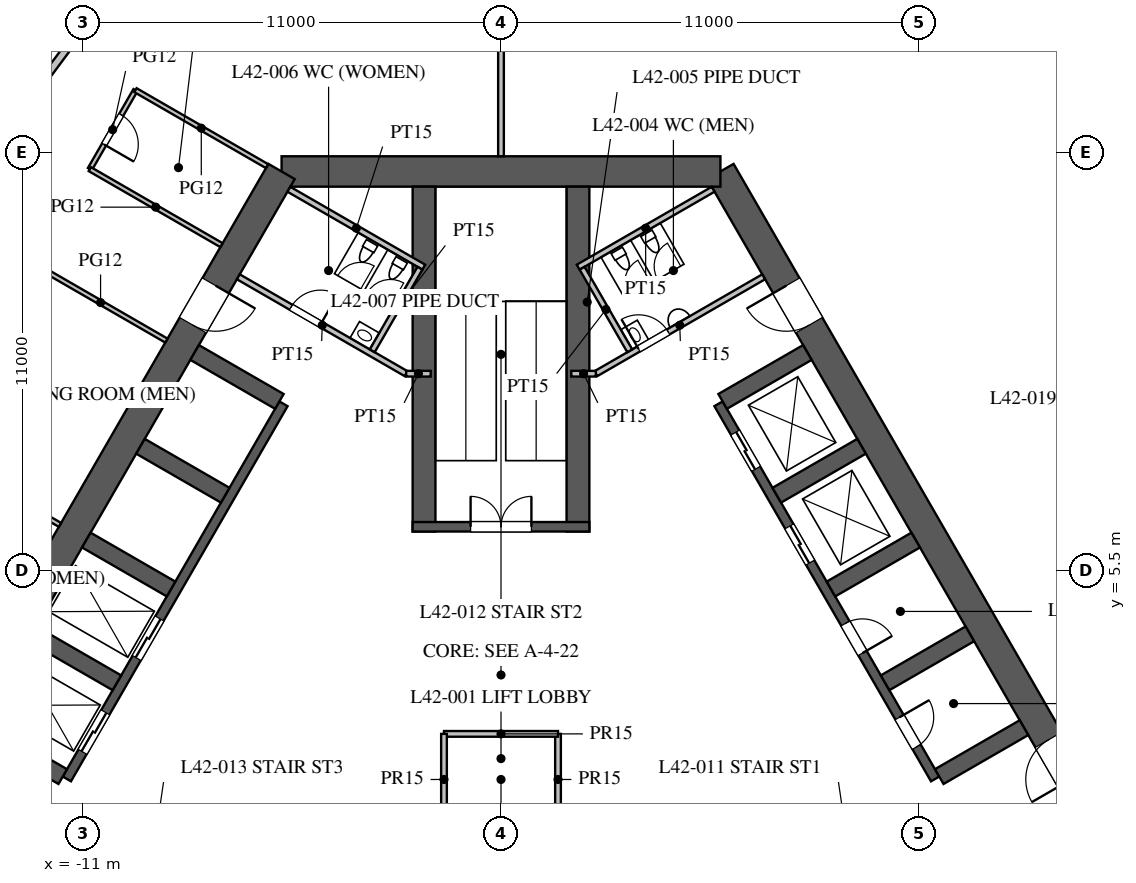
"""IFC4 building model, lengths in metres.
Left out: names, types, materials, properties, quantities, classifications, styles, units other than length and angle.
Written with IfcOpenShell. Run it as: python <this file> out.ifc"""

import sys

from ifc_helpers import new_model, si_unit, direction, frame, frame_2d, origin, place, context, subcontext, project, spatial, rectangle, extrude, element, fill, save


model = new_model("IFC4")
c1 = context("Model", 3, precision=1e-05, world=origin(), true_north=direction((0.0, 1.0)))
c2 = subcontext(c1, "Body", "Model", "MODEL_VIEW")
j1 = project(units=[si_unit("LENGTHUNIT", "METRE"), si_unit("PLANEANGLEUNIT", "RADIAN")], contexts=[c1])
p1 = place(None, origin())
s1 = spatial("IfcSite", under=j1, at=p1, CompositionType="ELEMENT")
p2 = place(p1, origin())
s2 = spatial("IfcBuilding", under=s1, at=p2, CompositionType="ELEMENT")
p3 = place(p2, frame((0.0, 0.0, 184.7)))
s3 = spatial("IfcBuildingStorey", under=s2, at=p3, CompositionType="ELEMENT", Elevation=184.7)
p4 = place(p3, frame((16.743, -3.0, 0.0), z_axis=(0.0, 0.0, 1.0), x_axis=(-0.500002442456, 0.866023993627, 0.0)))
e1 = element("IfcWall", 1, at=p4, inside=s3, PredefinedType="SHEAR", context=c2, shape_type="SweptSolid", body=[
    extrude(rectangle(XDim=21.939, YDim=0.8, at=frame_2d((10.97, 0.0))), origin(), (0.0, 0.0, 1.0), 5.0),
])
p5 = place(p4, frame((17.27, 0.0, 0.0)))
e2 = element("IfcOpeningElement", 2, at=p5, cuts=e1, PredefinedType="OPENING", context=c2, shape_type="SweptSolid", body=[
    extrude(rectangle(XDim=1.2, YDim=2.1, at=frame_2d((0.6, 1.05))), frame((0.0, 0.41, 0.0), z_axis=(0.0, -1.0, 0.0), x_axis=(1.0, 0.0, 0.0)), (0.0, 0.0, 1.0), 0.82),
])
p6 = place(p4, frame((3.47, 0.0, 0.0)))
e3 = element("IfcOpeningElement", 3, at=p6, cuts=e1, PredefinedType="OPENING", context=c2, shape_type="SweptSolid", body=[
    extrude(rectangle(XDim=1.2, YDim=2.1, at=frame_2d((0.6, 1.05))), frame((0.0, 0.41, 0.0), z_axis=(0.0, -1.0, 0.0), x_axis=(1.0, 0.0, 0.0)), (0.0, 0.0, 1.0), 0.82),
])
p7 = place(p3, frame((5.773, 16.0, 0.0), z_axis=(0.0, 0.0, 1.0), x_axis=(-1.0, 0.0, 0.0)))
e4 = element("IfcWall", 4, at=p7, inside=s3, PredefinedType="SHEAR", context=c2, shape_type="SweptSolid", body=[
    extrude(rectangle(XDim=11.547, YDim=0.8, at=frame_2d((5.773, 0.0))), origin(), (0.0, 0.0, 1.0), 5.0),
])
p8 = place(p3, frame((-5.773, 16.0, 0.0), z_axis=(0.0, 0.0, 1.0), x_axis=(-0.500002442456, -0.866023993627, 0.0)))
e5 = element("IfcWall", 5, at=p8, inside=s3, PredefinedType="SHEAR", context=c2, shape_type="SweptSolid", body=[
    extrude(rectangle(XDim=21.939, YDim=0.8, at=frame_2d((10.97, 0.0))), origin(), (0.0, 0.0, 1.0), 5.0),
])
p9 = place(p8, frame((17.27, 0.0, 0.0)))
e6 = element("IfcOpeningElement", 6, at=p9, cuts=e5, PredefinedType="OPENING", context=c2, shape_type="SweptSolid", body=[
    extrude(rectangle(XDim=1.2, YDim=2.1, at=frame_2d((0.6, 1.05))), frame((0.0, 0.41, 0.0), z_axis=(0.0, -1.0, 0.0), x_axis=(1.0, 0.0, 0.0)), (0.0, 0.0, 1.0), 0.82),
])
p10 = place(p8, frame((3.47, 0.0, 0.0)))
e7 = element("IfcOpeningElement", 7, at=p10, cuts=e5, PredefinedType="OPENING", context=c2, shape_type="SweptSolid", body=[
    extrude(rectangle(XDim=1.2, YDim=2.1, at=frame_2d((0.6, 1.05))), frame((0.0, 0.41, 0.0), z_axis=(0.0, -1.0, 0.0), x_axis=(1.0, 0.0, 0.0)), (0.0, 0.0, 1.0), 0.82),
])
p11 = place(p3, frame((11.424, 0.014, 0.0), z_axis=(0.0, 0.0, 1.0), x_axis=(-0.500001763848, 0.866024385424, 0.0)))
e8 = element("IfcWall", 8, at=p11, inside=s3, PredefinedType="SHEAR", context=c2, shape_type="SweptSolid", body=[
    extrude(rectangle(XDim=11.4, YDim=0.25, at=frame_2d((5.7, 0.0))), origin(), (0.0, 0.0, 1.0), 5.0),
])
p12 = place(p11, frame((0.975, 0.0, 0.0)))
e9 = element("IfcOpeningElement", 9, at=p12, cuts=e8, PredefinedType="OPENING", context=c2, shape_type="SweptSolid", body=[
    extrude(rectangle(XDim=0.9, YDim=2.1, at=frame_2d((0.45, 1.05))), frame((0.0, 0.135, 0.0), z_axis=(0.0, -1.0, 0.0), x_axis=(1.0, 0.0, 0.0)), (0.0, 0.0, 1.0), 0.27),
])
p13 = place(p11, frame((3.825, 0.0, 0.0)))
e10 = element("IfcOpeningElement", 10, at=p13, cuts=e8, PredefinedType="OPENING", context=c2, shape_type="SweptSolid", body=[
    extrude(rectangle(XDim=0.9, YDim=2.1, at=frame_2d((0.45, 1.05))), frame((0.0, 0.135, 0.0), z_axis=(0.0, -1.0, 0.0), x_axis=(1.0, 0.0, 0.0)), (0.0, 0.0, 1.0), 0.27),
])
p14 = place(p11, frame((6.575, 0.0, 0.0)))
e11 = element("IfcOpeningElement", 11, at=p14, cuts=e8, PredefinedType="OPENING", context=c2, shape_type="SweptSolid", body=[
    extrude(rectangle(XDim=1.1, YDim=2.2, at=frame_2d((0.55, 1.1))), frame((0.0, 0.135, 0.0), z_axis=(0.0, -1.0, 0.0), x_axis=(1.0, 0.0, 0.0)), (0.0, 0.0, 1.0), 0.27),
])
p15 = place(p11, frame((9.425, 0.0, 0.0)))
e12 = element("IfcOpeningElement", 12, at=p15, cuts=e8, PredefinedType="OPENING", context=c2, shape_type="SweptSolid", body=[
    extrude(rectangle(XDim=1.1, YDim=2.2, at=frame_2d((0.55, 1.1))), frame((0.0, 0.135, 0.0), z_axis=(0.0, -1.0, 0.0), x_axis=(1.0, 0.0, 0.0)), (0.0, 0.0, 1.0), 0.27),
])
for number, where, z_axis, x_axis in (
    (13, (11.532, 0.076, 0.0), (0.0, 0.0, 1.0), (0.866, 0.5, 0.0)),
    (14, (10.107, 2.544, 0.0), (0.0, 0.0, 1.0), (0.866, 0.5, 0.0)),
    (15, (8.682, 5.012, 0.0), (0.0, 0.0, 1.0), (0.866, 0.5, 0.0)),
    (16, (7.257, 7.481, 0.0), (0.0, 0.0, 1.0), (0.866, 0.5, 0.0)),
):
    element("IfcWall", number, at=place(p3, frame(where, z_axis=z_axis, x_axis=x_axis)), inside=s3, PredefinedType="SHEAR", context=c2, shape_type="SweptSolid", body=[
        extrude(rectangle(XDim=2.575, YDim=0.45, at=frame_2d((1.288, 0.0))), origin(), (0.0, 0.0, 1.0), 5.0),
    ])
p16 = place(p3, frame((5.832, 9.949, 0.0), z_axis=(0.0, 0.0, 1.0), x_axis=(0.866029291668, 0.499993265928, 0.0)))
e17 = element("IfcWall", 17, at=p16, inside=s3, PredefinedType="SHEAR", context=c2, shape_type="SweptSolid", body=[
    extrude(rectangle(XDim=2.575, YDim=0.45, at=frame_2d((1.288, 0.0))), origin(), (0.0, 0.0, 1.0), 5.0),
])
p17 = place(p3, frame((-5.724, 9.886, 0.0), z_axis=(0.0, 0.0, 1.0), x_axis=(-0.500001763848, -0.866024385424, 0.0)))
e18 = element("IfcWall", 18, at=p17, inside=s3, PredefinedType="SHEAR", context=c2, shape_type="SweptSolid", body=[
    extrude(rectangle(XDim=11.4, YDim=0.25, at=frame_2d((5.7, 0.0))), origin(), (0.0, 0.0, 1.0), 5.0),
])
p18 = place(p17, frame((6.525, 0.0, 0.0)))
e19 = element("IfcOpeningElement", 19, at=p18, cuts=e18, PredefinedType="OPENING", context=c2, shape_type="SweptSolid", body=[
    extrude(rectangle(XDim=1.2, YDim=2.2, at=frame_2d((0.6, 1.1))), frame((0.0, 0.135, 0.0), z_axis=(0.0, -1.0, 0.0), x_axis=(1.0, 0.0, 0.0)), (0.0, 0.0, 1.0), 0.27),
])
p19 = place(p17, frame((9.375, 0.0, 0.0)))
e20 = element("IfcOpeningElement", 20, at=p19, cuts=e18, PredefinedType="OPENING", context=c2, shape_type="SweptSolid", body=[
    extrude(rectangle(XDim=1.2, YDim=2.2, at=frame_2d((0.6, 1.1))), frame((0.0, 0.135, 0.0), z_axis=(0.0, -1.0, 0.0), x_axis=(1.0, 0.0, 0.0)), (0.0, 0.0, 1.0), 0.27),
])
p20 = place(p3, frame((-5.832, 9.949, 0.0), z_axis=(0.0, 0.0, 1.0), x_axis=(-0.866029291668, 0.499993265928, 0.0)))
e21 = element("IfcWall", 21, at=p20, inside=s3, PredefinedType="SHEAR", context=c2, shape_type="SweptSolid", body=[
    extrude(rectangle(XDim=2.575, YDim=0.45, at=frame_2d((1.288, 0.0))), origin(), (0.0, 0.0, 1.0), 5.0),
])
for number, where, z_axis, x_axis in (
    (22, (-7.257, 7.481, 0.0), (0.0, 0.0, 1.0), (-0.866, 0.5, 0.0)),
    (23, (-8.682, 5.012, 0.0), (0.0, 0.0, 1.0), (-0.866, 0.5, 0.0)),
    (24, (-10.107, 2.544, 0.0), (0.0, 0.0, 1.0), (-0.866, 0.5, 0.0)),
    (25, (-11.532, 0.076, 0.0), (0.0, 0.0, 1.0), (-0.866, 0.5, 0.0)),
):
    element("IfcWall", number, at=place(p3, frame(where, z_axis=z_axis, x_axis=x_axis)), inside=s3, PredefinedType="SHEAR", context=c2, shape_type="SweptSolid", body=[
        extrude(rectangle(XDim=2.575, YDim=0.45, at=frame_2d((1.288, 0.0))), origin(), (0.0, 0.0, 1.0), 5.0),
    ])
for number, where, z_axis, x_axis in (
    (26, (2.025, 6.525, 0.0), (0.0, 0.0, 1.0), (0.0, 1.0, 0.0)),
    (27, (-2.025, 6.525, 0.0), (0.0, 0.0, 1.0), (0.0, 1.0, 0.0)),
):
    element("IfcWall", number, at=place(p3, frame(where, z_axis=z_axis, x_axis=x_axis)), inside=s3, PredefinedType="SHEAR", context=c2, shape_type="SweptSolid", body=[
        extrude(rectangle(XDim=9.075, YDim=0.6, at=frame_2d((4.538, 0.0))), origin(), (0.0, 0.0, 1.0), 5.0),
    ])
p21 = place(p3, frame((2.325, 6.65, 0.0), z_axis=(0.0, 0.0, 1.0), x_axis=(-1.0, 0.0, 0.0)))
e28 = element("IfcWall", 28, at=p21, inside=s3, PredefinedType="SHEAR", context=c2, shape_type="SweptSolid", body=[
    extrude(rectangle(XDim=4.65, YDim=0.25, at=frame_2d((2.325, 0.0))), origin(), (0.0, 0.0, 1.0), 5.0),
])
p22 = place(p21, frame((1.525, 0.0, 0.0)))
e29 = element("IfcOpeningElement", 29, at=p22, cuts=e28, PredefinedType="OPENING", context=c2, shape_type="SweptSolid", body=[
    extrude(rectangle(XDim=1.6, YDim=2.1, at=frame_2d((0.8, 1.05))), frame((0.0, 0.135, 0.0), z_axis=(0.0, -1.0, 0.0), x_axis=(1.0, 0.0, 0.0)), (0.0, 0.0, 1.0), 0.27),
])
p23 = place(p3, frame((2.495, 10.678, 0.0), z_axis=(0.0, 0.0, 1.0), x_axis=(0.86602216432, 0.500005610874, 0.0)))
e30 = element("IfcWall", 30, at=p23, inside=s3, PredefinedType="PARTITIONING", context=c2, shape_type="SweptSolid", body=[
    extrude(rectangle(XDim=5.1, YDim=0.15, at=frame_2d((2.55, 0.0))), origin(), (0.0, 0.0, 1.0), 4.8),
])
p24 = place(p23, frame((1.3, 0.0, 0.0)))
e31 = element("IfcOpeningElement", 31, at=p24, cuts=e30, PredefinedType="OPENING", context=c2, shape_type="SweptSolid", body=[
    extrude(rectangle(XDim=0.9, YDim=2.1, at=frame_2d((0.45, 1.05))), frame((0.0, 0.085, 0.0), z_axis=(0.0, -1.0, 0.0), x_axis=(1.0, 0.0, 0.0)), (0.0, 0.0, 1.0), 0.17),
])
p25 = place(p3, frame((10.495, -3.178, 0.0), z_axis=(0.0, 0.0, 1.0), x_axis=(0.86602216432, 0.500005610874, 0.0)))
e32 = element("IfcWall", 32, at=p25, inside=s3, PredefinedType="PARTITIONING", context=c2, shape_type="SweptSolid", body=[
    extrude(rectangle(XDim=5.1, YDim=0.15, at=frame_2d((2.55, 0.0))), origin(), (0.0, 0.0, 1.0), 4.8),
])
p26 = place(p25, frame((2.6, 0.0, 0.0)))
e33 = element("IfcOpeningElement", 33, at=p26, cuts=e32, PredefinedType="OPENING", context=c2, shape_type="SweptSolid", body=[
    extrude(rectangle(XDim=0.9, YDim=2.1, at=frame_2d((0.45, 1.05))), frame((0.0, 0.085, 0.0), z_axis=(0.0, -1.0, 0.0), x_axis=(1.0, 0.0, 0.0)), (0.0, 0.0, 1.0), 0.17),
])
p27 = place(p3, frame((-10.495, -3.178, 0.0), z_axis=(0.0, 0.0, 1.0), x_axis=(-0.86602216432, 0.500005610874, 0.0)))
e34 = element("IfcWall", 34, at=p27, inside=s3, PredefinedType="PARTITIONING", context=c2, shape_type="SweptSolid", body=[
    extrude(rectangle(XDim=5.1, YDim=0.15, at=frame_2d((2.55, 0.0))), origin(), (0.0, 0.0, 1.0), 4.8),
])
p28 = place(p27, frame((1.3, 0.0, 0.0)))
e35 = element("IfcOpeningElement", 35, at=p28, cuts=e34, PredefinedType="OPENING", context=c2, shape_type="SweptSolid", body=[
    extrude(rectangle(XDim=0.9, YDim=2.1, at=frame_2d((0.45, 1.05))), frame((0.0, 0.085, 0.0), z_axis=(0.0, -1.0, 0.0), x_axis=(1.0, 0.0, 0.0)), (0.0, 0.0, 1.0), 0.17),
])
p29 = place(p3, frame((-2.495, 10.678, 0.0), z_axis=(0.0, 0.0, 1.0), x_axis=(-0.86602216432, 0.500005610874, 0.0)))
e36 = element("IfcWall", 36, at=p29, inside=s3, PredefinedType="PARTITIONING", context=c2, shape_type="SweptSolid", body=[
    extrude(rectangle(XDim=5.1, YDim=0.15, at=frame_2d((2.55, 0.0))), origin(), (0.0, 0.0, 1.0), 4.8),
])
p30 = place(p29, frame((2.6, 0.0, 0.0)))
e37 = element("IfcOpeningElement", 37, at=p30, cuts=e36, PredefinedType="OPENING", context=c2, shape_type="SweptSolid", body=[
    extrude(rectangle(XDim=0.9, YDim=2.1, at=frame_2d((0.45, 1.05))), frame((0.0, 0.085, 0.0), z_axis=(0.0, -1.0, 0.0), x_axis=(1.0, 0.0, 0.0)), (0.0, 0.0, 1.0), 0.17),
])
for number, where, z_axis, x_axis in (
    (38, (2.495, 10.678, 0.0), (0.0, 0.0, 1.0), (-1.0, 0.0, 0.0)),
    (39, (-2.495, 10.678, 0.0), (0.0, 0.0, 1.0), (1.0, 0.0, 0.0)),
):
    element("IfcWall", number, at=place(p3, frame(where, z_axis=z_axis, x_axis=x_axis)), inside=s3, PredefinedType="PARTITIONING", context=c2, shape_type="SweptSolid", body=[
        extrude(rectangle(XDim=0.645, YDim=0.15, at=frame_2d((0.323, 0.0))), origin(), (0.0, 0.0, 1.0), 4.8),
    ])
p31 = place(p3, frame((2.031, 13.482, 0.0), z_axis=(0.0, 0.0, 1.0), x_axis=(0.866050731258, 0.499956128963, 0.0)))
e40 = element("IfcWall", 40, at=p31, inside=s3, PredefinedType="PARTITIONING", context=c2, shape_type="SweptSolid", body=[
    extrude(rectangle(XDim=4.1, YDim=0.15, at=frame_2d((2.05, 0.0))), origin(), (0.0, 0.0, 1.0), 4.8),
])
p32 = place(p3, frame((3.389, 11.281, 0.0), z_axis=(0.0, 0.0, 1.0), x_axis=(-0.499989096993, 0.866031698547, 0.0)))
e41 = element("IfcWall", 41, at=p32, inside=s3, PredefinedType="PARTITIONING", context=c2, shape_type="SweptSolid", body=[
    extrude(rectangle(XDim=2.51, YDim=0.15, at=frame_2d((1.255, 0.0))), origin(), (0.0, 0.0, 1.0), 4.8),
])
p33 = place(p3, frame((-2.031, 13.482, 0.0), z_axis=(0.0, 0.0, 1.0), x_axis=(-0.866050731258, 0.499956128963, 0.0)))
e42 = element("IfcWall", 42, at=p33, inside=s3, PredefinedType="PARTITIONING", context=c2, shape_type="SweptSolid", body=[
    extrude(rectangle(XDim=4.1, YDim=0.15, at=frame_2d((2.05, 0.0))), origin(), (0.0, 0.0, 1.0), 4.8),
])
p34 = place(p3, frame((-3.389, 11.281, 0.0), z_axis=(0.0, 0.0, 1.0), x_axis=(0.499989096993, 0.866031698547, 0.0)))
e43 = element("IfcWall", 43, at=p34, inside=s3, PredefinedType="PARTITIONING", context=c2, shape_type="SweptSolid", body=[
    extrude(rectangle(XDim=2.51, YDim=0.15, at=frame_2d((1.255, 0.0))), origin(), (0.0, 0.0, 1.0), 4.8),
])
p35 = place(p3, frame((1.5, -1.2, 0.0), z_axis=(0.0, 0.0, 1.0), x_axis=(0.0, 1.0, 0.0)))
e44 = element("IfcWall", 44, at=p35, inside=s3, PredefinedType="PARTITIONING", context=c2, shape_type="SweptSolid", body=[
    extrude(rectangle(XDim=2.4, YDim=0.15, at=frame_2d((1.2, 0.0))), origin(), (0.0, 0.0, 1.0), 4.8),
])
p36 = place(p3, frame((1.5, 1.2, 0.0), z_axis=(0.0, 0.0, 1.0), x_axis=(-1.0, 0.0, 0.0)))
e45 = element("IfcWall", 45, at=p36, inside=s3, PredefinedType="PARTITIONING", context=c2, shape_type="SweptSolid", body=[
    extrude(rectangle(XDim=3.0, YDim=0.15, at=frame_2d((1.5, 0.0))), origin(), (0.0, 0.0, 1.0), 4.8),
])
p37 = place(p3, frame((-1.5, 1.2, 0.0), z_axis=(0.0, 0.0, 1.0), x_axis=(0.0, -1.0, 0.0)))
e46 = element("IfcWall", 46, at=p37, inside=s3, PredefinedType="PARTITIONING", context=c2, shape_type="SweptSolid", body=[
    extrude(rectangle(XDim=2.4, YDim=0.15, at=frame_2d((1.2, 0.0))), origin(), (0.0, 0.0, 1.0), 4.8),
])
p38 = place(p3, frame((0.0, 16.4, 0.0), z_axis=(0.0, 0.0, 1.0), x_axis=(0.0, 1.0, 0.0)))
e47 = element("IfcWall", 47, at=p38, inside=s3, PredefinedType="PARTITIONING", context=c2, shape_type="SweptSolid", body=[
    extrude(rectangle(XDim=14.95, YDim=0.15, at=frame_2d((7.475, 0.0))), origin(), (0.0, 0.0, 1.0), 3.2),
])
p39 = place(p3, frame((-9.619, 18.14, 0.0), z_axis=(0.0, 0.0, 1.0), x_axis=(-0.500001309137, -0.866024647952, 0.0)))
e48 = element("IfcWall", 48, at=p39, inside=s3, PredefinedType="PARTITIONING", context=c2, shape_type="SweptSolid", body=[
    extrude(rectangle(XDim=2.4, YDim=0.12, at=frame_2d((1.2, 0.0))), origin(), (0.0, 0.0, 1.0), 3.6),
])
p40 = place(p39, frame((0.75, 0.0, 0.0)))
e49 = element("IfcOpeningElement", 49, at=p40, cuts=e48, PredefinedType="OPENING", context=c2, shape_type="SweptSolid", body=[
    extrude(rectangle(XDim=0.9, YDim=2.1, at=frame_2d((0.45, 1.05))), frame((0.0, 0.07, 0.0), z_axis=(0.0, -1.0, 0.0), x_axis=(1.0, 0.0, 0.0)), (0.0, 0.0, 1.0), 0.14),
])
p41 = place(p3, frame((-11.605, 6.7, 0.0), z_axis=(0.0, 0.0, 1.0), x_axis=(-0.866026010844, 0.49999894854, 0.0)))
e50 = element("IfcWall", 50, at=p41, inside=s3, PredefinedType="PARTITIONING", context=c2, shape_type="SweptSolid", body=[
    extrude(rectangle(XDim=4.0, YDim=0.12, at=frame_2d((2.0, 0.0))), origin(), (0.0, 0.0, 1.0), 3.4),
])
for number, where, z_axis, x_axis in (
    (51, (-6.155, 16.14, 0.0), (0.0, 0.0, 1.0), (-0.866, 0.5, 0.0)),
    (52, (-8.805, 11.55, 0.0), (0.0, 0.0, 1.0), (-0.866, 0.5, 0.0)),
    (53, (-7.355, 14.061, 0.0), (0.0, 0.0, 1.0), (-0.866, 0.5, 0.0)),
):
    element("IfcWall", number, at=place(p3, frame(where, z_axis=z_axis, x_axis=x_axis)), inside=s3, PredefinedType="PARTITIONING", context=c2, shape_type="SweptSolid", body=[
        extrude(rectangle(XDim=4.0, YDim=0.12, at=frame_2d((2.0, 0.0))), origin(), (0.0, 0.0, 1.0), 3.6),
    ])
p42 = place(p3, frame((-9.892, 21.299, 0.0), z_axis=(0.0, 0.0, 1.0), x_axis=(-0.596173167565, -0.802855873912, 0.0)))
e54 = element("IfcWall", 54, at=p42, inside=s3, PredefinedType="PARTITIONING", context=c2, shape_type="SweptSolid", body=[
    extrude(rectangle(XDim=4.53, YDim=0.2, at=frame_2d((2.265, 0.0))), origin(), (0.0, 0.0, 1.0), 3.6),
])
p43 = place(p24, origin())
e55 = element("IfcDoor", 55, at=p43, inside=s3, OperationType="SINGLE_SWING_LEFT", PredefinedType="DOOR", context=c2, shape_type="SweptSolid", body=[
    extrude(rectangle(XDim=0.9, YDim=2.1, at=frame_2d((0.45, 1.05))), frame((0.0, 0.025, 0.0), z_axis=(0.0, -1.0, 0.0), x_axis=(1.0, 0.0, 0.0)), (0.0, 0.0, 1.0), 0.05),
])
fill(e31, e55)
p44 = place(p30, frame((0.9, 0.0, 0.0), z_axis=(0.0, 0.0, 1.0), x_axis=(-1.0, 0.0, 0.0)))
e56 = element("IfcDoor", 56, at=p44, inside=s3, OperationType="SINGLE_SWING_RIGHT", PredefinedType="DOOR", context=c2, shape_type="SweptSolid", body=[
    extrude(rectangle(XDim=0.9, YDim=2.1, at=frame_2d((0.45, 1.05))), frame((0.0, 0.025, 0.0), z_axis=(0.0, -1.0, 0.0), x_axis=(1.0, 0.0, 0.0)), (0.0, 0.0, 1.0), 0.05),
])
fill(e37, e56)
p45 = place(p22, frame((1.6, 0.0, 0.0), z_axis=(0.0, 0.0, 1.0), x_axis=(-1.0, 0.0, 0.0)))
e57 = element("IfcDoor", 57, at=p45, inside=s3, OperationType="DOUBLE_DOOR_SINGLE_SWING", PredefinedType="DOOR", context=c2, shape_type="SweptSolid", body=[
    extrude(rectangle(XDim=1.6, YDim=2.1, at=frame_2d((0.8, 1.05))), frame((0.0, 0.025, 0.0), z_axis=(0.0, -1.0, 0.0), x_axis=(1.0, 0.0, 0.0)), (0.0, 0.0, 1.0), 0.05),
])
fill(e29, e57)
p46 = place(p5, origin())
e58 = element("IfcDoor", 58, at=p46, inside=s3, OperationType="SINGLE_SWING_RIGHT", PredefinedType="DOOR", context=c2, shape_type="SweptSolid", body=[
    extrude(rectangle(XDim=1.2, YDim=2.1, at=frame_2d((0.6, 1.05))), frame((0.0, 0.025, 0.0), z_axis=(0.0, -1.0, 0.0), x_axis=(1.0, 0.0, 0.0)), (0.0, 0.0, 1.0), 0.05),
])
fill(e2, e58)
p47 = place(p6, origin())
e59 = element("IfcDoor", 59, at=p47, inside=s3, OperationType="SINGLE_SWING_LEFT", PredefinedType="DOOR", context=c2, shape_type="SweptSolid", body=[
    extrude(rectangle(XDim=1.2, YDim=2.1, at=frame_2d((0.6, 1.05))), frame((0.0, 0.025, 0.0), z_axis=(0.0, -1.0, 0.0), x_axis=(1.0, 0.0, 0.0)), (0.0, 0.0, 1.0), 0.05),
])
fill(e3, e59)
p48 = place(p10, origin())
e60 = element("IfcDoor", 60, at=p48, inside=s3, OperationType="SINGLE_SWING_LEFT", PredefinedType="DOOR", context=c2, shape_type="SweptSolid", body=[
    extrude(rectangle(XDim=1.2, YDim=2.1, at=frame_2d((0.6, 1.05))), frame((0.0, 0.025, 0.0), z_axis=(0.0, -1.0, 0.0), x_axis=(1.0, 0.0, 0.0)), (0.0, 0.0, 1.0), 0.05),
])
fill(e7, e60)
p49 = place(p12, frame((0.9, 0.0, 0.0), z_axis=(0.0, 0.0, 1.0), x_axis=(-1.0, 0.0, 0.0)))
e61 = element("IfcDoor", 61, at=p49, inside=s3, OperationType="SINGLE_SWING_LEFT", PredefinedType="DOOR", context=c2, shape_type="SweptSolid", body=[
    extrude(rectangle(XDim=0.9, YDim=2.1, at=frame_2d((0.45, 1.05))), frame((0.0, 0.025, 0.0), z_axis=(0.0, -1.0, 0.0), x_axis=(1.0, 0.0, 0.0)), (0.0, 0.0, 1.0), 0.05),
])
fill(e9, e61)
p50 = place(p13, frame((0.9, 0.0, 0.0), z_axis=(0.0, 0.0, 1.0), x_axis=(-1.0, 0.0, 0.0)))
e62 = element("IfcDoor", 62, at=p50, inside=s3, OperationType="SINGLE_SWING_RIGHT", PredefinedType="DOOR", context=c2, shape_type="SweptSolid", body=[
    extrude(rectangle(XDim=0.9, YDim=2.1, at=frame_2d((0.45, 1.05))), frame((0.0, 0.025, 0.0), z_axis=(0.0, -1.0, 0.0), x_axis=(1.0, 0.0, 0.0)), (0.0, 0.0, 1.0), 0.05),
])
fill(e10, e62)
p51 = place(p40, origin())
e63 = element("IfcDoor", 63, at=p51, inside=s3, OperationType="SINGLE_SWING_RIGHT", PredefinedType="DOOR", context=c2, shape_type="SweptSolid", body=[
    extrude(rectangle(XDim=0.9, YDim=2.1, at=frame_2d((0.45, 1.05))), frame((0.0, 0.025, 0.0), z_axis=(0.0, -1.0, 0.0), x_axis=(1.0, 0.0, 0.0)), (0.0, 0.0, 1.0), 0.05),
])
fill(e49, e63)
p52 = place(p14, origin())
e64 = element("IfcDoor", 64, at=p52, inside=s3, OperationType="DOUBLE_DOOR_SLIDING", PredefinedType="DOOR", context=c2, shape_type="SweptSolid", body=[
    extrude(rectangle(XDim=1.1, YDim=2.2, at=frame_2d((0.55, 1.1))), frame((0.0, 0.025, 0.0), z_axis=(0.0, -1.0, 0.0), x_axis=(1.0, 0.0, 0.0)), (0.0, 0.0, 1.0), 0.05),
])
fill(e11, e64)
p53 = place(p15, origin())
e65 = element("IfcDoor", 65, at=p53, inside=s3, OperationType="DOUBLE_DOOR_SLIDING", PredefinedType="DOOR", context=c2, shape_type="SweptSolid", body=[
    extrude(rectangle(XDim=1.1, YDim=2.2, at=frame_2d((0.55, 1.1))), frame((0.0, 0.025, 0.0), z_axis=(0.0, -1.0, 0.0), x_axis=(1.0, 0.0, 0.0)), (0.0, 0.0, 1.0), 0.05),
])
fill(e12, e65)
p54 = place(p18, origin())
e66 = element("IfcDoor", 66, at=p54, inside=s3, OperationType="DOUBLE_DOOR_SLIDING", PredefinedType="DOOR", context=c2, shape_type="SweptSolid", body=[
    extrude(rectangle(XDim=1.2, YDim=2.2, at=frame_2d((0.6, 1.1))), frame((0.0, 0.025, 0.0), z_axis=(0.0, -1.0, 0.0), x_axis=(1.0, 0.0, 0.0)), (0.0, 0.0, 1.0), 0.05),
])
fill(e19, e66)
p55 = place(p19, origin())
e67 = element("IfcDoor", 67, at=p55, inside=s3, OperationType="DOUBLE_DOOR_SLIDING", PredefinedType="DOOR", context=c2, shape_type="SweptSolid", body=[
    extrude(rectangle(XDim=1.2, YDim=2.2, at=frame_2d((0.6, 1.1))), frame((0.0, 0.025, 0.0), z_axis=(0.0, -1.0, 0.0), x_axis=(1.0, 0.0, 0.0)), (0.0, 0.0, 1.0), 0.05),
])
fill(e20, e67)
save(model, sys.argv[1])
